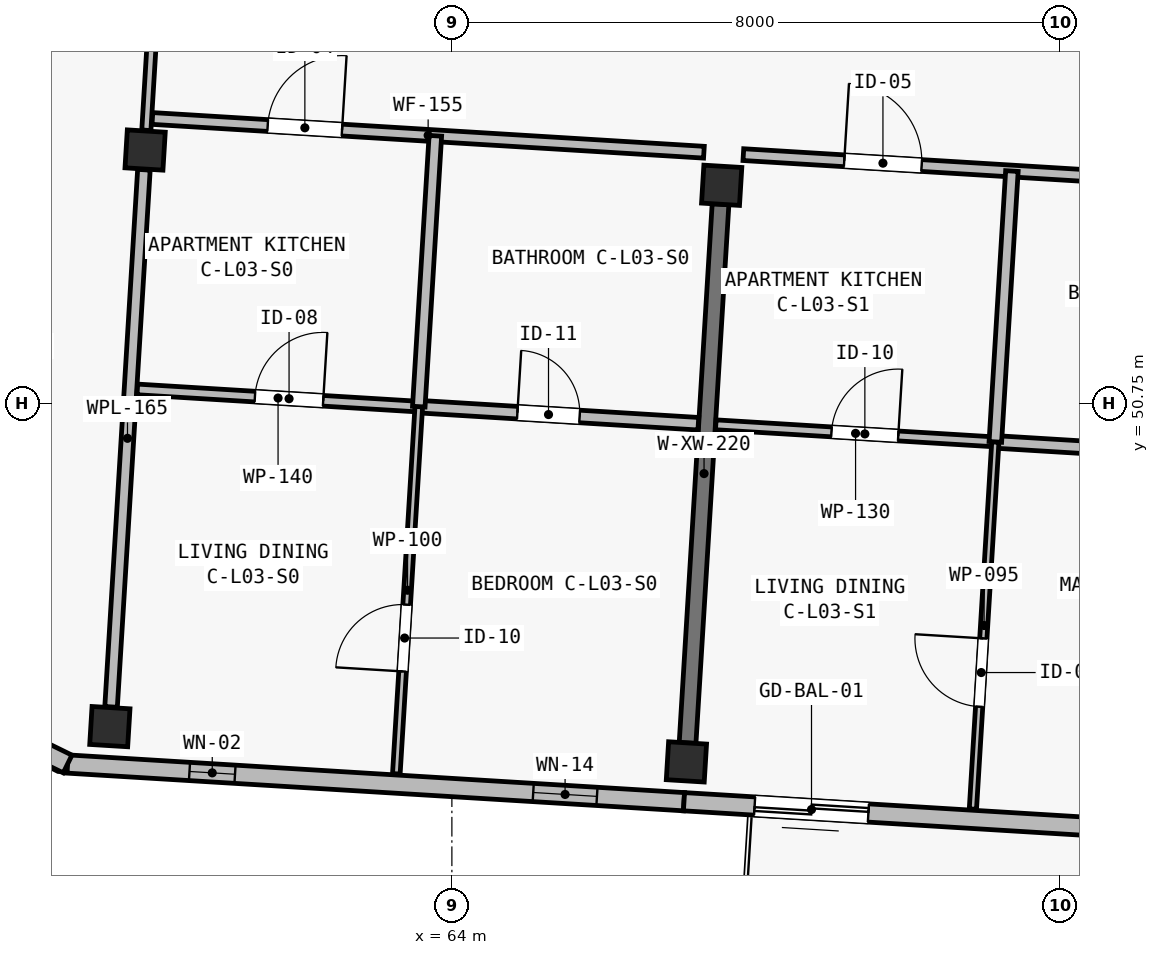
"""IFC4 building model, lengths in metres.
Left out: names, types, materials, properties, quantities, classifications, styles, units other than length and angle.
Written with IfcOpenShell. Run it as: python <this file> out.ifc"""

import sys

from ifc_helpers import new_model, si_unit, direction, frame, frame_2d, origin, origin_2d, place, context, subcontext, project, spatial, rectangle, extrude, element, fill, save


model = new_model("IFC4")
c1 = context("Model", 3, precision=1e-05, world=origin(), true_north=direction((0.0, 1.0)))
c2 = subcontext(c1, "Body", "Model", "MODEL_VIEW")
j1 = project(units=[si_unit("LENGTHUNIT", "METRE"), si_unit("PLANEANGLEUNIT", "RADIAN")], contexts=[c1])
p1 = place(None, origin())
s1 = spatial("IfcSite", under=j1, at=p1, CompositionType="ELEMENT")
p2 = place(p1, origin())
s2 = spatial("IfcBuilding", under=s1, at=p2, CompositionType="ELEMENT")
p3 = place(p2, frame((0.0, 0.0, 11.65)))
s3 = spatial("IfcBuildingStorey", under=s2, at=p3, CompositionType="ELEMENT", Elevation=11.65)
for number, where, z_axis, x_axis in (
    (1, (59.5, 46.5, 0.0), (0.0, 0.0, 1.0), (0.998, -0.061, 0.0)),
    (2, (59.964, 54.086, 0.0), (0.0, 0.0, 1.0), (0.998, -0.061, 0.0)),
    (3, (67.086, 46.036, 0.0), (0.0, 0.0, 1.0), (0.998, -0.061, 0.0)),
    (4, (67.55, 53.622, 0.0), (0.0, 0.0, 1.0), (0.998, -0.061, 0.0)),
):
    element("IfcColumn", number, at=place(p3, frame(where, z_axis=z_axis, x_axis=x_axis)), inside=s3, PredefinedType="COLUMN", context=c2, shape_type="SweptSolid", body=[
        extrude(rectangle(XDim=0.5, YDim=0.5, at=origin_2d()), origin(), (0.0, 0.0, 1.0), 3.25),
    ])
p4 = place(p3, frame((67.101, 46.286, 0.0), z_axis=(0.0, 0.0, 1.0), x_axis=(0.061035953884, 0.998135568114, 0.0)))
e5 = element("IfcWall", 5, at=p4, inside=s3, PredefinedType="SHEAR", context=c2, shape_type="SweptSolid", body=[
    extrude(rectangle(XDim=7.1, YDim=0.22, at=frame_2d((3.55, 0.0))), origin(), (0.0, 0.0, 1.0), 2.5),
])
p5 = place(p3, frame((67.054, 45.512, 0.0), z_axis=(0.0, 0.0, 1.0), x_axis=(-0.998134248939, 0.061057522844, 0.0)))
e6 = element("IfcWall", 6, at=p5, inside=s3, PredefinedType="SOLIDWALL", context=c2, shape_type="SweptSolid", body=[
    extrude(rectangle(XDim=8.125, YDim=0.24, at=frame_2d((4.062, 0.0))), origin(), (0.0, 0.0, 1.0), 3.0),
])
p6 = place(p5, frame((1.147, 0.0, 0.42)))
e7 = element("IfcOpeningElement", 7, at=p6, cuts=e6, PredefinedType="OPENING", context=c2, shape_type="SweptSolid", body=[
    extrude(rectangle(XDim=0.84, YDim=2.28, at=frame_2d((0.42, 1.14))), frame((0.0, 0.135, 0.0), z_axis=(0.0, -1.0, 0.0), x_axis=(1.0, 0.0, 0.0)), (0.0, 0.0, 1.0), 0.27),
])
p7 = place(p5, frame((5.918, 0.0, 0.42)))
e8 = element("IfcOpeningElement", 8, at=p7, cuts=e6, PredefinedType="OPENING", context=c2, shape_type="SweptSolid", body=[
    extrude(rectangle(XDim=0.6, YDim=2.22, at=frame_2d((0.3, 1.11))), frame((0.0, 0.135, 0.0), z_axis=(0.0, -1.0, 0.0), x_axis=(1.0, 0.0, 0.0)), (0.0, 0.0, 1.0), 0.27),
])
p8 = place(p3, frame((74.64, 45.048, 0.0), z_axis=(0.0, 0.0, 1.0), x_axis=(-0.998135669243, 0.061034300063, 0.0)))
e9 = element("IfcWall", 9, at=p8, inside=s3, PredefinedType="SOLIDWALL", context=c2, shape_type="SweptSolid", body=[
    extrude(rectangle(XDim=7.6, YDim=0.24, at=frame_2d((3.8, 0.0))), origin(), (0.0, 0.0, 1.0), 3.0),
])
p9 = place(p8, frame((5.169, 0.0, 0.0)))
e10 = element("IfcOpeningElement", 10, at=p9, cuts=e9, PredefinedType="OPENING", context=c2, shape_type="SweptSolid", body=[
    extrude(rectangle(XDim=1.5, YDim=2.12, at=frame_2d((0.75, 1.06))), frame((0.0, 0.135, 0.0), z_axis=(0.0, -1.0, 0.0), x_axis=(1.0, 0.0, 0.0)), (0.0, 0.0, 1.0), 0.27),
])
p10 = place(p8, frame((0.83, 0.0, 0.46)))
e11 = element("IfcOpeningElement", 11, at=p10, cuts=e9, PredefinedType="OPENING", context=c2, shape_type="SweptSolid", body=[
    extrude(rectangle(XDim=0.78, YDim=2.2, at=frame_2d((0.39, 1.1))), frame((0.0, 0.135, 0.0), z_axis=(0.0, -1.0, 0.0), x_axis=(1.0, 0.0, 0.0)), (0.0, 0.0, 1.0), 0.27),
])
p11 = place(p3, frame((58.944, 46.008, 0.0), z_axis=(0.0, 0.0, 1.0), x_axis=(-0.897775054318, 0.440454256246, 0.0)))
e12 = element("IfcWall", 12, at=p11, inside=s3, PredefinedType="SOLIDWALL", context=c2, shape_type="SweptSolid", body=[
    extrude(rectangle(XDim=8.12, YDim=0.26, at=frame_2d((4.06, 0.0))), origin(), (0.0, 0.0, 1.0), 3.0),
])
p12 = place(p11, frame((4.65, 0.0, 0.45)))
e13 = element("IfcOpeningElement", 13, at=p12, cuts=e12, PredefinedType="OPENING", context=c2, shape_type="SweptSolid", body=[
    extrude(rectangle(XDim=0.84, YDim=2.28, at=frame_2d((0.42, 1.14))), frame((0.0, 0.145, 0.0), z_axis=(0.0, -1.0, 0.0), x_axis=(1.0, 0.0, 0.0)), (0.0, 0.0, 1.0), 0.29),
])
p13 = place(p3, frame((51.654, 49.585, 0.0), z_axis=(0.0, 0.0, 1.0), x_axis=(0.448621989068, 0.893721607059, 0.0)))
e14 = element("IfcWall", 14, at=p13, inside=s3, PredefinedType="SOLIDWALL", context=c2, shape_type="SweptSolid", body=[
    extrude(rectangle(XDim=19.061, YDim=0.26, at=frame_2d((9.53, 0.0))), origin(), (0.0, 0.0, 1.0), 3.0),
])
p14 = place(p13, frame((15.59, 0.0, 0.45)))
e15 = element("IfcOpeningElement", 15, at=p14, cuts=e14, PredefinedType="OPENING", context=c2, shape_type="SweptSolid", body=[
    extrude(rectangle(XDim=0.84, YDim=2.28, at=frame_2d((0.42, 1.14))), frame((0.0, 0.145, 0.0), z_axis=(0.0, -1.0, 0.0), x_axis=(1.0, 0.0, 0.0)), (0.0, 0.0, 1.0), 0.29),
])
p15 = place(p3, frame((59.98, 54.345, 0.0), z_axis=(0.0, 0.0, 1.0), x_axis=(0.061101107425, 0.998131581843, 0.0)))
e16 = element("IfcWall", 16, at=p15, inside=s3, PredefinedType="PARTITIONING", context=c2, shape_type="SweptSolid", body=[
    extrude(rectangle(XDim=3.88, YDim=0.12, at=frame_2d((1.94, 0.0))), origin(), (0.0, 0.0, 1.0), 2.5),
])
p16 = place(p15, frame((1.35, 0.0, 0.0)))
e17 = element("IfcOpeningElement", 17, at=p16, cuts=e16, PredefinedType="OPENING", context=c2, shape_type="SweptSolid", body=[
    extrude(rectangle(XDim=0.88, YDim=2.1, at=frame_2d((0.44, 1.05))), frame((0.0, 0.075, 0.0), z_axis=(0.0, -1.0, 0.0), x_axis=(1.0, 0.0, 0.0)), (0.0, 0.0, 1.0), 0.15),
])
p17 = place(p3, frame((59.516, 46.76, 0.0), z_axis=(0.0, 0.0, 1.0), x_axis=(0.061034344288, 0.998135666539, 0.0)))
e18 = element("IfcWall", 18, at=p17, inside=s3, PredefinedType="PLUMBINGWALL", context=c2, shape_type="SweptSolid", body=[
    extrude(rectangle(XDim=7.08, YDim=0.165, at=frame_2d((3.54, 0.0))), origin(), (0.0, 0.0, 1.0), 2.5),
])
p18 = place(p3, frame((60.06, 54.501, 0.0), z_axis=(0.0, 0.0, 1.0), x_axis=(0.998134543433, -0.06105270843, 0.0)))
e19 = element("IfcWall", 19, at=p18, inside=s3, PredefinedType="PARTITIONING", context=c2, shape_type="SweptSolid", body=[
    extrude(rectangle(XDim=7.27, YDim=0.155, at=frame_2d((3.635, 0.0))), origin(), (0.0, 0.0, 1.0), 2.97),
])
p19 = place(p18, frame((1.52, 0.0, 0.0)))
e20 = element("IfcOpeningElement", 20, at=p19, cuts=e19, PredefinedType="OPENING", context=c2, shape_type="SweptSolid", body=[
    extrude(rectangle(XDim=0.98, YDim=2.15, at=frame_2d((0.49, 1.075))), frame((0.0, 0.093, 0.0), z_axis=(0.0, -1.0, 0.0), x_axis=(1.0, 0.0, 0.0)), (0.0, 0.0, 1.0), 0.185),
])
p20 = place(p3, frame((59.862, 50.936, 0.0), z_axis=(0.0, 0.0, 1.0), x_axis=(0.998133653934, -0.061067248869, 0.0)))
e21 = element("IfcWall", 21, at=p20, inside=s3, PredefinedType="PARTITIONING", context=c2, shape_type="SweptSolid", body=[
    extrude(rectangle(XDim=3.71, YDim=0.14, at=frame_2d((1.855, 0.0))), origin(), (0.0, 0.0, 1.0), 2.97),
])
p21 = place(p20, frame((1.55, 0.0, 0.0)))
e22 = element("IfcOpeningElement", 22, at=p21, cuts=e21, PredefinedType="OPENING", context=c2, shape_type="SweptSolid", body=[
    extrude(rectangle(XDim=0.9, YDim=2.1, at=frame_2d((0.45, 1.05))), frame((0.0, 0.085, 0.0), z_axis=(0.0, -1.0, 0.0), x_axis=(1.0, 0.0, 0.0)), (0.0, 0.0, 1.0), 0.17),
])
p22 = place(p3, frame((63.565, 50.71, 0.0), z_axis=(0.0, 0.0, 1.0), x_axis=(0.998136472989, -0.061021154439, 0.0)))
e23 = element("IfcWall", 23, at=p22, inside=s3, PredefinedType="PLUMBINGWALL", context=c2, shape_type="SweptSolid", body=[
    extrude(rectangle(XDim=3.685, YDim=0.165, at=frame_2d((1.842, 0.0))), origin(), (0.0, 0.0, 1.0), 2.97),
])
p23 = place(p22, frame((1.3, 0.0, 0.0)))
e24 = element("IfcOpeningElement", 24, at=p23, cuts=e23, PredefinedType="OPENING", context=c2, shape_type="SweptSolid", body=[
    extrude(rectangle(XDim=0.82, YDim=2.08, at=frame_2d((0.41, 1.04))), frame((0.0, 0.097, 0.0), z_axis=(0.0, -1.0, 0.0), x_axis=(1.0, 0.0, 0.0)), (0.0, 0.0, 1.0), 0.195),
])
p24 = place(p3, frame((63.269, 45.879, 0.0), z_axis=(0.0, 0.0, 1.0), x_axis=(0.061084424005, 0.998132602986, 0.0)))
e25 = element("IfcWall", 25, at=p24, inside=s3, PredefinedType="PARTITIONING", context=c2, shape_type="SweptSolid", body=[
    extrude(rectangle(XDim=4.84, YDim=0.1, at=frame_2d((2.42, 0.0))), origin(), (0.0, 0.0, 1.0), 2.97),
])
p25 = place(p24, frame((1.35, 0.0, 0.0)))
e26 = element("IfcOpeningElement", 26, at=p25, cuts=e25, PredefinedType="OPENING", context=c2, shape_type="SweptSolid", body=[
    extrude(rectangle(XDim=0.88, YDim=2.1, at=frame_2d((0.44, 1.05))), frame((0.0, 0.065, 0.0), z_axis=(0.0, -1.0, 0.0), x_axis=(1.0, 0.0, 0.0)), (0.0, 0.0, 1.0), 0.13),
])
p26 = place(p3, frame((63.565, 50.71, 0.0), z_axis=(0.0, 0.0, 1.0), x_axis=(0.06100299582, 0.998137582952, 0.0)))
e27 = element("IfcWall", 27, at=p26, inside=s3, PredefinedType="PLUMBINGWALL", context=c2, shape_type="SweptSolid", body=[
    extrude(rectangle(XDim=3.57, YDim=0.165, at=frame_2d((1.785, 0.0))), origin(), (0.0, 0.0, 1.0), 2.97),
])
p27 = place(p3, frame((67.835, 54.025, 0.0), z_axis=(0.0, 0.0, 1.0), x_axis=(0.998135666539, -0.061034344288, 0.0)))
e28 = element("IfcWall", 28, at=p27, inside=s3, PredefinedType="PARTITIONING", context=c2, shape_type="SweptSolid", body=[
    extrude(rectangle(XDim=7.08, YDim=0.155, at=frame_2d((3.54, 0.0))), origin(), (0.0, 0.0, 1.0), 2.97),
])
p28 = place(p27, frame((1.33, 0.0, 0.0)))
e29 = element("IfcOpeningElement", 29, at=p28, cuts=e28, PredefinedType="OPENING", context=c2, shape_type="SweptSolid", body=[
    extrude(rectangle(XDim=1.02, YDim=2.2, at=frame_2d((0.51, 1.1))), frame((0.0, 0.093, 0.0), z_axis=(0.0, -1.0, 0.0), x_axis=(1.0, 0.0, 0.0)), (0.0, 0.0, 1.0), 0.185),
])
p29 = place(p3, frame((67.472, 50.471, 0.0), z_axis=(0.0, 0.0, 1.0), x_axis=(0.998136719672, -0.061017119263, 0.0)))
e30 = element("IfcWall", 30, at=p29, inside=s3, PredefinedType="PARTITIONING", context=c2, shape_type="SweptSolid", body=[
    extrude(rectangle(XDim=3.685, YDim=0.13, at=frame_2d((1.843, 0.0))), origin(), (0.0, 0.0, 1.0), 2.97),
])
p30 = place(p29, frame((1.525, 0.0, 0.0)))
e31 = element("IfcOpeningElement", 31, at=p30, cuts=e30, PredefinedType="OPENING", context=c2, shape_type="SweptSolid", body=[
    extrude(rectangle(XDim=0.88, YDim=2.1, at=frame_2d((0.44, 1.05))), frame((0.0, 0.08, 0.0), z_axis=(0.0, -1.0, 0.0), x_axis=(1.0, 0.0, 0.0)), (0.0, 0.0, 1.0), 0.16),
])
p31 = place(p3, frame((71.15, 50.246, 0.0), z_axis=(0.0, 0.0, 1.0), x_axis=(0.998132682596, -0.061083123148, 0.0)))
e32 = element("IfcWall", 32, at=p31, inside=s3, PredefinedType="PLUMBINGWALL", context=c2, shape_type="SweptSolid", body=[
    extrude(rectangle(XDim=3.685, YDim=0.165, at=frame_2d((1.843, 0.0))), origin(), (0.0, 0.0, 1.0), 2.97),
])
p32 = place(p31, frame((1.3, 0.0, 0.0)))
e33 = element("IfcOpeningElement", 33, at=p32, cuts=e32, PredefinedType="OPENING", context=c2, shape_type="SweptSolid", body=[
    extrude(rectangle(XDim=0.82, YDim=2.08, at=frame_2d((0.41, 1.04))), frame((0.0, 0.097, 0.0), z_axis=(0.0, -1.0, 0.0), x_axis=(1.0, 0.0, 0.0)), (0.0, 0.0, 1.0), 0.195),
])
p33 = place(p3, frame((70.855, 45.415, 0.0), z_axis=(0.0, 0.0, 1.0), x_axis=(0.061034170677, 0.998135677155, 0.0)))
e34 = element("IfcWall", 34, at=p33, inside=s3, PredefinedType="PARTITIONING", context=c2, shape_type="SweptSolid", body=[
    extrude(rectangle(XDim=4.84, YDim=0.095, at=frame_2d((2.42, 0.0))), origin(), (0.0, 0.0, 1.0), 2.97),
])
p34 = place(p33, frame((1.35, 0.0, 0.0)))
e35 = element("IfcOpeningElement", 35, at=p34, cuts=e34, PredefinedType="OPENING", context=c2, shape_type="SweptSolid", body=[
    extrude(rectangle(XDim=0.9, YDim=2.1, at=frame_2d((0.45, 1.05))), frame((0.0, 0.062, 0.0), z_axis=(0.0, -1.0, 0.0), x_axis=(1.0, 0.0, 0.0)), (0.0, 0.0, 1.0), 0.125),
])
p35 = place(p3, frame((71.15, 50.246, 0.0), z_axis=(0.0, 0.0, 1.0), x_axis=(0.061071129902, 0.998133416479, 0.0)))
e36 = element("IfcWall", 36, at=p35, inside=s3, PredefinedType="PLUMBINGWALL", context=c2, shape_type="SweptSolid", body=[
    extrude(rectangle(XDim=3.57, YDim=0.165, at=frame_2d((1.785, 0.0))), origin(), (0.0, 0.0, 1.0), 2.97),
])
p36 = place(p6, origin())
e37 = element("IfcWindow", 37, at=p36, inside=s3, PartitioningType="SINGLE_PANEL", PredefinedType="WINDOW", context=c2, shape_type="SweptSolid", body=[
    extrude(rectangle(XDim=0.84, YDim=2.28, at=frame_2d((0.42, 1.14))), frame((0.0, 0.03, 0.0), z_axis=(0.0, -1.0, 0.0), x_axis=(1.0, 0.0, 0.0)), (0.0, 0.0, 1.0), 0.06),
])
fill(e7, e37)
p37 = place(p7, origin())
e38 = element("IfcWindow", 38, at=p37, inside=s3, PartitioningType="SINGLE_PANEL", PredefinedType="WINDOW", context=c2, shape_type="SweptSolid", body=[
    extrude(rectangle(XDim=0.6, YDim=2.22, at=frame_2d((0.3, 1.11))), frame((0.0, 0.03, 0.0), z_axis=(0.0, -1.0, 0.0), x_axis=(1.0, 0.0, 0.0)), (0.0, 0.0, 1.0), 0.06),
])
fill(e8, e38)
p38 = place(p9, origin())
e39 = element("IfcDoor", 39, at=p38, inside=s3, OperationType="SLIDING_TO_RIGHT", PredefinedType="DOOR", context=c2, shape_type="SweptSolid", body=[
    extrude(rectangle(XDim=1.5, YDim=2.12, at=frame_2d((0.75, 1.06))), frame((0.0, 0.025, 0.0), z_axis=(0.0, -1.0, 0.0), x_axis=(1.0, 0.0, 0.0)), (0.0, 0.0, 1.0), 0.05),
])
fill(e10, e39)
p39 = place(p19, origin())
e40 = element("IfcDoor", 40, at=p39, inside=s3, OperationType="SINGLE_SWING_RIGHT", PredefinedType="DOOR", context=c2, shape_type="SweptSolid", body=[
    extrude(rectangle(XDim=0.98, YDim=2.15, at=frame_2d((0.49, 1.075))), frame((0.0, 0.025, 0.0), z_axis=(0.0, -1.0, 0.0), x_axis=(1.0, 0.0, 0.0)), (0.0, 0.0, 1.0), 0.05),
])
fill(e20, e40)
p40 = place(p21, origin())
e41 = element("IfcDoor", 41, at=p40, inside=s3, OperationType="SINGLE_SWING_RIGHT", PredefinedType="DOOR", context=c2, shape_type="SweptSolid", body=[
    extrude(rectangle(XDim=0.9, YDim=2.1, at=frame_2d((0.45, 1.05))), frame((0.0, 0.025, 0.0), z_axis=(0.0, -1.0, 0.0), x_axis=(1.0, 0.0, 0.0)), (0.0, 0.0, 1.0), 0.05),
])
fill(e22, e41)
p41 = place(p23, origin())
e42 = element("IfcDoor", 42, at=p41, inside=s3, OperationType="SINGLE_SWING_LEFT", PredefinedType="DOOR", context=c2, shape_type="SweptSolid", body=[
    extrude(rectangle(XDim=0.82, YDim=2.08, at=frame_2d((0.41, 1.04))), frame((0.0, 0.025, 0.0), z_axis=(0.0, -1.0, 0.0), x_axis=(1.0, 0.0, 0.0)), (0.0, 0.0, 1.0), 0.05),
])
fill(e24, e42)
p42 = place(p25, origin())
e43 = element("IfcDoor", 43, at=p42, inside=s3, OperationType="SINGLE_SWING_LEFT", PredefinedType="DOOR", context=c2, shape_type="SweptSolid", body=[
    extrude(rectangle(XDim=0.88, YDim=2.1, at=frame_2d((0.44, 1.05))), frame((0.0, 0.025, 0.0), z_axis=(0.0, -1.0, 0.0), x_axis=(1.0, 0.0, 0.0)), (0.0, 0.0, 1.0), 0.05),
])
fill(e26, e43)
p43 = place(p28, origin())
e44 = element("IfcDoor", 44, at=p43, inside=s3, OperationType="SINGLE_SWING_LEFT", PredefinedType="DOOR", context=c2, shape_type="SweptSolid", body=[
    extrude(rectangle(XDim=1.02, YDim=2.2, at=frame_2d((0.51, 1.1))), frame((0.0, 0.025, 0.0), z_axis=(0.0, -1.0, 0.0), x_axis=(1.0, 0.0, 0.0)), (0.0, 0.0, 1.0), 0.05),
])
fill(e29, e44)
p44 = place(p30, origin())
e45 = element("IfcDoor", 45, at=p44, inside=s3, OperationType="SINGLE_SWING_RIGHT", PredefinedType="DOOR", context=c2, shape_type="SweptSolid", body=[
    extrude(rectangle(XDim=0.88, YDim=2.1, at=frame_2d((0.44, 1.05))), frame((0.0, 0.025, 0.0), z_axis=(0.0, -1.0, 0.0), x_axis=(1.0, 0.0, 0.0)), (0.0, 0.0, 1.0), 0.05),
])
fill(e31, e45)
p45 = place(p34, origin())
e46 = element("IfcDoor", 46, at=p45, inside=s3, OperationType="SINGLE_SWING_RIGHT", PredefinedType="DOOR", context=c2, shape_type="SweptSolid", body=[
    extrude(rectangle(XDim=0.9, YDim=2.1, at=frame_2d((0.45, 1.05))), frame((0.0, 0.025, 0.0), z_axis=(0.0, -1.0, 0.0), x_axis=(1.0, 0.0, 0.0)), (0.0, 0.0, 1.0), 0.05),
])
fill(e35, e46)
save(model, sys.argv[1])
